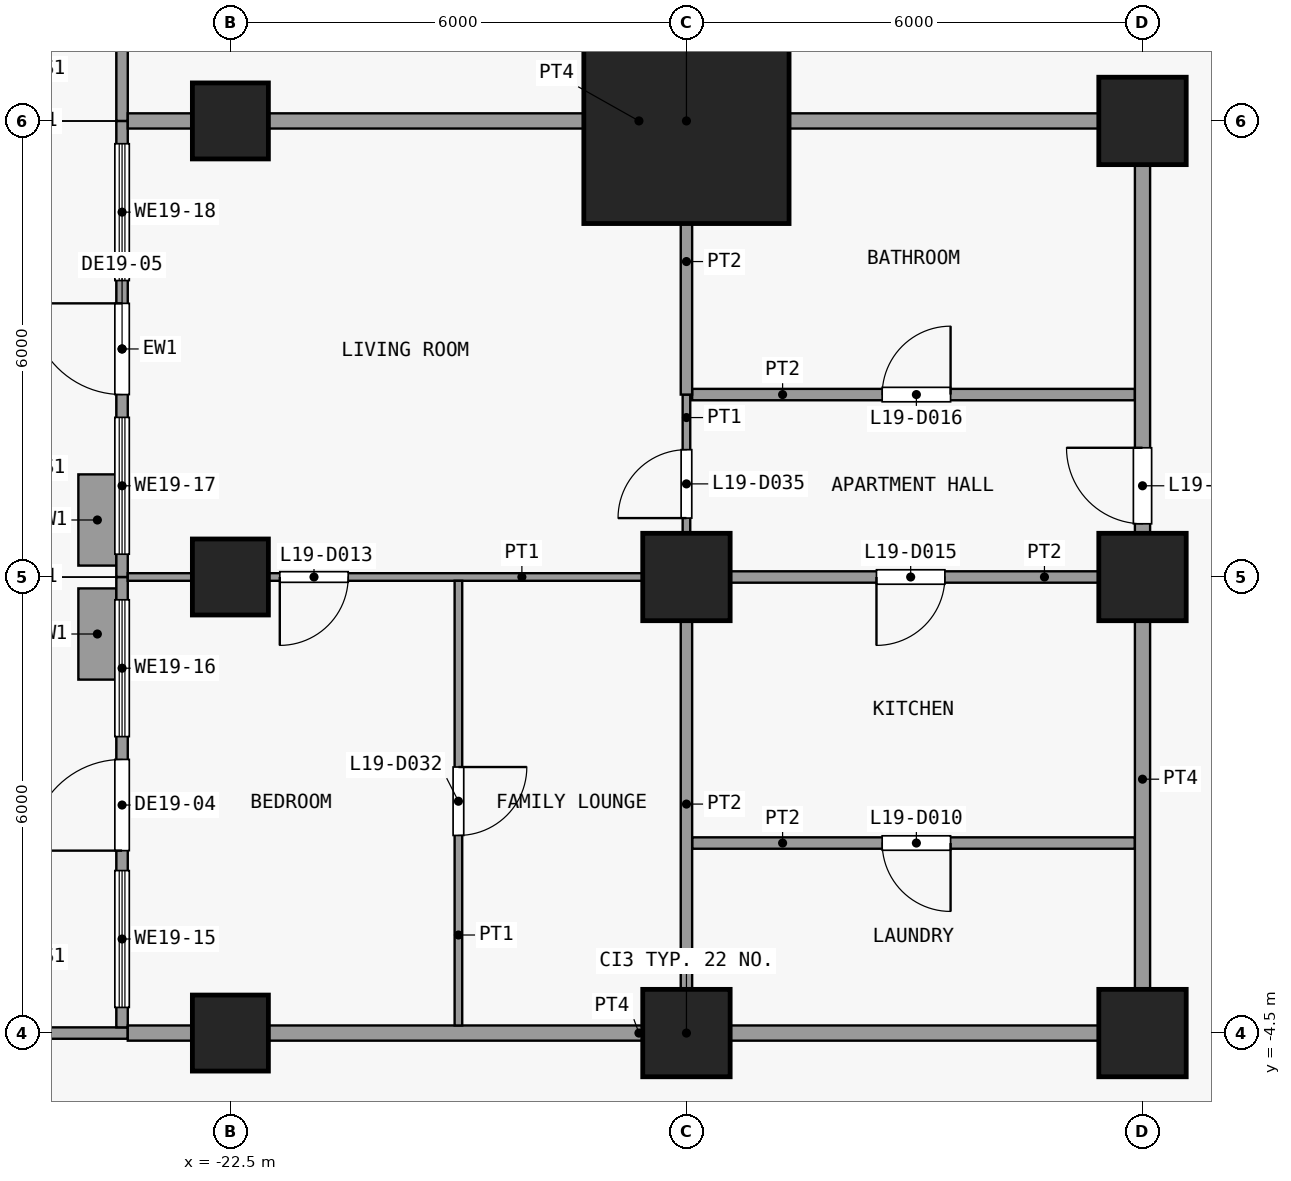
"""IFC4 building model, lengths in metres.
Left out: names, types, materials, properties, quantities, classifications, styles, units other than length and angle.
Written with IfcOpenShell. Run it as: python <this file> out.ifc"""

import sys

from ifc_helpers import new_model, si_unit, direction, frame, frame_2d, origin, origin_2d, place, context, subcontext, project, spatial, rectangle, extrude, element, fill, save


model = new_model("IFC4")
c1 = context("Model", 3, precision=1e-05, world=origin(), true_north=direction((0.0, 1.0)))
c2 = subcontext(c1, "Body", "Model", "MODEL_VIEW")
j1 = project(units=[si_unit("LENGTHUNIT", "METRE"), si_unit("PLANEANGLEUNIT", "RADIAN")], contexts=[c1])
p1 = place(None, origin())
s1 = spatial("IfcSite", under=j1, at=p1, CompositionType="ELEMENT")
p2 = place(p1, origin())
s2 = spatial("IfcBuilding", under=s1, at=p2, CompositionType="ELEMENT")
p3 = place(p2, frame((0.0, 0.0, 81.1)))
s3 = spatial("IfcBuildingStorey", under=s2, at=p3, CompositionType="ELEMENT", Elevation=81.1)
for number, where, z_axis, x_axis in (
    (1, (-22.5, -4.5, 0.0), (0.0, 0.0, 1.0), (1.0, 0.0, 0.0)),
    (2, (-22.5, 1.5, 0.0), (0.0, 0.0, 1.0), (1.0, 0.0, 0.0)),
    (3, (-22.5, 7.5, 0.0), (0.0, 0.0, 1.0), (1.0, 0.0, 0.0)),
):
    element("IfcColumn", number, at=place(p3, frame(where, z_axis=z_axis, x_axis=x_axis)), inside=s3, PredefinedType="COLUMN", context=c2, shape_type="SweptSolid", body=[
        extrude(rectangle(XDim=1.0, YDim=1.0, at=origin_2d()), origin(), (0.0, 0.0, 1.0), 3.6),
    ])
for number, where, z_axis, x_axis in (
    (4, (-16.5, -4.5, 0.0), (0.0, 0.0, 1.0), (1.0, 0.0, 0.0)),
    (5, (-16.5, 1.5, 0.0), (0.0, 0.0, 1.0), (1.0, 0.0, 0.0)),
):
    element("IfcColumn", number, at=place(p3, frame(where, z_axis=z_axis, x_axis=x_axis)), inside=s3, PredefinedType="COLUMN", context=c2, shape_type="SweptSolid", body=[
        extrude(rectangle(XDim=1.15, YDim=1.15, at=origin_2d()), origin(), (0.0, 0.0, 1.0), 3.6),
    ])
p4 = place(p3, frame((-16.5, 7.5, 0.0), z_axis=(0.0, 0.0, 1.0), x_axis=(1.0, 0.0, 0.0)))
e6 = element("IfcColumn", 6, at=p4, inside=s3, PredefinedType="COLUMN", context=c2, shape_type="SweptSolid", body=[
    extrude(rectangle(XDim=2.7, YDim=2.7, at=origin_2d()), origin(), (0.0, 0.0, 1.0), 3.6),
])
for number, where, z_axis, x_axis in (
    (7, (-10.5, -4.5, 0.0), (0.0, 0.0, 1.0), (1.0, 0.0, 0.0)),
    (8, (-10.5, 1.5, 0.0), (0.0, 0.0, 1.0), (1.0, 0.0, 0.0)),
    (9, (-10.5, 7.5, 0.0), (0.0, 0.0, 1.0), (1.0, 0.0, 0.0)),
):
    element("IfcColumn", number, at=place(p3, frame(where, z_axis=z_axis, x_axis=x_axis)), inside=s3, PredefinedType="COLUMN", context=c2, shape_type="SweptSolid", body=[
        extrude(rectangle(XDim=1.15, YDim=1.15, at=origin_2d()), origin(), (0.0, 0.0, 1.0), 3.6),
    ])
p5 = place(p3, frame((-23.85, -4.5, 0.0), z_axis=(0.0, 0.0, 1.0), x_axis=(-1.0, 0.0, 0.0)))
e10 = element("IfcWall", 10, at=p5, inside=s3, PredefinedType="SOLIDWALL", context=c2, shape_type="SweptSolid", body=[
    extrude(rectangle(XDim=2.55, YDim=0.15, at=frame_2d((1.275, 0.0))), origin(), (0.0, 0.0, 1.0), 3.3),
])
p6 = place(p3, frame((-23.925, -4.425, 0.0), z_axis=(0.0, 0.0, 1.0), x_axis=(0.0, 1.0, 0.0)))
e11 = element("IfcWall", 11, at=p6, inside=s3, PredefinedType="SOLIDWALL", context=c2, shape_type="SweptSolid", body=[
    extrude(rectangle(XDim=5.925, YDim=0.15, at=frame_2d((2.962, 0.0))), origin(), (0.0, 0.0, 1.0), 3.3),
])
p7 = place(p6, frame((2.325, 0.0, 0.0)))
e12 = element("IfcOpeningElement", 12, at=p7, cuts=e11, PredefinedType="OPENING", context=c2, shape_type="SweptSolid", body=[
    extrude(rectangle(XDim=1.2, YDim=2.4, at=frame_2d((0.6, 1.2))), frame((0.0, 0.085, 0.0), z_axis=(0.0, -1.0, 0.0), x_axis=(1.0, 0.0, 0.0)), (0.0, 0.0, 1.0), 0.17),
])
p8 = place(p6, frame((0.262, 0.0, 0.9)))
e13 = element("IfcOpeningElement", 13, at=p8, cuts=e11, PredefinedType="OPENING", context=c2, shape_type="SweptSolid", body=[
    extrude(rectangle(XDim=1.8, YDim=2.1, at=frame_2d((0.9, 1.05))), frame((0.0, 0.085, 0.0), z_axis=(0.0, -1.0, 0.0), x_axis=(1.0, 0.0, 0.0)), (0.0, 0.0, 1.0), 0.17),
])
p9 = place(p6, frame((3.825, 0.0, 0.9)))
e14 = element("IfcOpeningElement", 14, at=p9, cuts=e11, PredefinedType="OPENING", context=c2, shape_type="SweptSolid", body=[
    extrude(rectangle(XDim=1.8, YDim=2.1, at=frame_2d((0.9, 1.05))), frame((0.0, 0.085, 0.0), z_axis=(0.0, -1.0, 0.0), x_axis=(1.0, 0.0, 0.0)), (0.0, 0.0, 1.0), 0.17),
])
p10 = place(p3, frame((-24.25, 0.15, 0.0), z_axis=(0.0, 0.0, 1.0), x_axis=(0.0, 1.0, 0.0)))
e15 = element("IfcWall", 15, at=p10, inside=s3, PredefinedType="USERDEFINED", context=c2, shape_type="SweptSolid", body=[
    extrude(rectangle(XDim=1.2, YDim=0.5, at=frame_2d((0.6, 0.0))), origin(), (0.0, 0.0, 1.0), 0.9),
])
p11 = place(p3, frame((-23.925, 1.5, 0.0), z_axis=(0.0, 0.0, 1.0), x_axis=(0.0, 1.0, 0.0)))
e16 = element("IfcWall", 16, at=p11, inside=s3, PredefinedType="SOLIDWALL", context=c2, shape_type="SweptSolid", body=[
    extrude(rectangle(XDim=6.0, YDim=0.15, at=frame_2d((3.0, 0.0))), origin(), (0.0, 0.0, 1.0), 3.3),
])
p12 = place(p11, frame((2.4, 0.0, 0.0)))
e17 = element("IfcOpeningElement", 17, at=p12, cuts=e16, PredefinedType="OPENING", context=c2, shape_type="SweptSolid", body=[
    extrude(rectangle(XDim=1.2, YDim=2.4, at=frame_2d((0.6, 1.2))), frame((0.0, 0.085, 0.0), z_axis=(0.0, -1.0, 0.0), x_axis=(1.0, 0.0, 0.0)), (0.0, 0.0, 1.0), 0.17),
])
p13 = place(p11, frame((0.3, 0.0, 0.9)))
e18 = element("IfcOpeningElement", 18, at=p13, cuts=e16, PredefinedType="OPENING", context=c2, shape_type="SweptSolid", body=[
    extrude(rectangle(XDim=1.8, YDim=2.1, at=frame_2d((0.9, 1.05))), frame((0.0, 0.085, 0.0), z_axis=(0.0, -1.0, 0.0), x_axis=(1.0, 0.0, 0.0)), (0.0, 0.0, 1.0), 0.17),
])
p14 = place(p11, frame((3.9, 0.0, 0.9)))
e19 = element("IfcOpeningElement", 19, at=p14, cuts=e16, PredefinedType="OPENING", context=c2, shape_type="SweptSolid", body=[
    extrude(rectangle(XDim=1.8, YDim=2.1, at=frame_2d((0.9, 1.05))), frame((0.0, 0.085, 0.0), z_axis=(0.0, -1.0, 0.0), x_axis=(1.0, 0.0, 0.0)), (0.0, 0.0, 1.0), 0.17),
])
p15 = place(p3, frame((-24.25, 1.65, 0.0), z_axis=(0.0, 0.0, 1.0), x_axis=(0.0, 1.0, 0.0)))
e20 = element("IfcWall", 20, at=p15, inside=s3, PredefinedType="USERDEFINED", context=c2, shape_type="SweptSolid", body=[
    extrude(rectangle(XDim=1.2, YDim=0.5, at=frame_2d((0.6, 0.0))), origin(), (0.0, 0.0, 1.0), 0.9),
])
p16 = place(p3, frame((-23.925, 7.5, 0.0), z_axis=(0.0, 0.0, 1.0), x_axis=(0.0, 1.0, 0.0)))
e21 = element("IfcWall", 21, at=p16, inside=s3, PredefinedType="SOLIDWALL", context=c2, shape_type="SweptSolid", body=[
    extrude(rectangle(XDim=5.925, YDim=0.15, at=frame_2d((2.962, 0.0))), origin(), (0.0, 0.0, 1.0), 3.3),
])
p17 = place(p16, frame((3.9, 0.0, 0.0)))
e22 = element("IfcOpeningElement", 22, at=p17, cuts=e21, PredefinedType="OPENING", context=c2, shape_type="SweptSolid", body=[
    extrude(rectangle(XDim=1.2, YDim=2.4, at=frame_2d((0.6, 1.2))), frame((0.0, 0.085, 0.0), z_axis=(0.0, -1.0, 0.0), x_axis=(1.0, 0.0, 0.0)), (0.0, 0.0, 1.0), 0.17),
])
p18 = place(p16, frame((1.05, 0.0, 0.9)))
e23 = element("IfcOpeningElement", 23, at=p18, cuts=e21, PredefinedType="OPENING", context=c2, shape_type="SweptSolid", body=[
    extrude(rectangle(XDim=1.8, YDim=2.1, at=frame_2d((0.9, 1.05))), frame((0.0, 0.085, 0.0), z_axis=(0.0, -1.0, 0.0), x_axis=(1.0, 0.0, 0.0)), (0.0, 0.0, 1.0), 0.17),
])
p19 = place(p3, frame((-23.85, -4.5, 0.0), z_axis=(0.0, 0.0, 1.0), x_axis=(1.0, 0.0, 0.0)))
e24 = element("IfcWall", 24, at=p19, inside=s3, PredefinedType="PARTITIONING", context=c2, shape_type="SweptSolid", body=[
    extrude(rectangle(XDim=13.45, YDim=0.2, at=frame_2d((6.725, 0.0))), origin(), (0.0, 0.0, 1.0), 3.3),
])
p20 = place(p3, frame((-16.425, -2.0, 0.0), z_axis=(0.0, 0.0, 1.0), x_axis=(1.0, 0.0, 0.0)))
e25 = element("IfcWall", 25, at=p20, inside=s3, PredefinedType="PARTITIONING", context=c2, shape_type="SweptSolid", body=[
    extrude(rectangle(XDim=5.825, YDim=0.15, at=frame_2d((2.913, 0.0))), origin(), (0.0, 0.0, 1.0), 3.3),
])
p21 = place(p20, frame((2.5, 0.0, 0.0)))
e26 = element("IfcOpeningElement", 26, at=p21, cuts=e25, PredefinedType="OPENING", context=c2, shape_type="SweptSolid", body=[
    extrude(rectangle(XDim=0.9, YDim=2.1, at=frame_2d((0.45, 1.05))), frame((0.0, 0.085, 0.0), z_axis=(0.0, -1.0, 0.0), x_axis=(1.0, 0.0, 0.0)), (0.0, 0.0, 1.0), 0.17),
])
p22 = place(p3, frame((-23.85, 1.5, 0.0), z_axis=(0.0, 0.0, 1.0), x_axis=(1.0, 0.0, 0.0)))
e27 = element("IfcWall", 27, at=p22, inside=s3, PredefinedType="PARTITIONING", context=c2, shape_type="SweptSolid", body=[
    extrude(rectangle(XDim=7.35, YDim=0.1, at=frame_2d((3.675, 0.0))), origin(), (0.0, 0.0, 1.0), 3.3),
])
p23 = place(p22, frame((2.0, 0.0, 0.0)))
e28 = element("IfcOpeningElement", 28, at=p23, cuts=e27, PredefinedType="OPENING", context=c2, shape_type="SweptSolid", body=[
    extrude(rectangle(XDim=0.9, YDim=2.1, at=frame_2d((0.45, 1.05))), frame((0.0, 0.06, 0.0), z_axis=(0.0, -1.0, 0.0), x_axis=(1.0, 0.0, 0.0)), (0.0, 0.0, 1.0), 0.12),
])
p24 = place(p3, frame((-16.5, 1.5, 0.0), z_axis=(0.0, 0.0, 1.0), x_axis=(1.0, 0.0, 0.0)))
e29 = element("IfcWall", 29, at=p24, inside=s3, PredefinedType="PARTITIONING", context=c2, shape_type="SweptSolid", body=[
    extrude(rectangle(XDim=5.9, YDim=0.15, at=frame_2d((2.95, 0.0))), origin(), (0.0, 0.0, 1.0), 3.3),
])
p25 = place(p24, frame((2.5, 0.0, 0.0)))
e30 = element("IfcOpeningElement", 30, at=p25, cuts=e29, PredefinedType="OPENING", context=c2, shape_type="SweptSolid", body=[
    extrude(rectangle(XDim=0.9, YDim=2.1, at=frame_2d((0.45, 1.05))), frame((0.0, 0.085, 0.0), z_axis=(0.0, -1.0, 0.0), x_axis=(1.0, 0.0, 0.0)), (0.0, 0.0, 1.0), 0.17),
])
p26 = place(p3, frame((-16.425, 3.9, 0.0), z_axis=(0.0, 0.0, 1.0), x_axis=(1.0, 0.0, 0.0)))
e31 = element("IfcWall", 31, at=p26, inside=s3, PredefinedType="PARTITIONING", context=c2, shape_type="SweptSolid", body=[
    extrude(rectangle(XDim=5.825, YDim=0.15, at=frame_2d((2.913, 0.0))), origin(), (0.0, 0.0, 1.0), 3.3),
])
p27 = place(p26, frame((2.5, 0.0, 0.0)))
e32 = element("IfcOpeningElement", 32, at=p27, cuts=e31, PredefinedType="OPENING", context=c2, shape_type="SweptSolid", body=[
    extrude(rectangle(XDim=0.9, YDim=2.1, at=frame_2d((0.45, 1.05))), frame((0.0, 0.085, 0.0), z_axis=(0.0, -1.0, 0.0), x_axis=(1.0, 0.0, 0.0)), (0.0, 0.0, 1.0), 0.17),
])
p28 = place(p3, frame((-23.85, 7.5, 0.0), z_axis=(0.0, 0.0, 1.0), x_axis=(1.0, 0.0, 0.0)))
e33 = element("IfcWall", 33, at=p28, inside=s3, PredefinedType="PARTITIONING", context=c2, shape_type="SweptSolid", body=[
    extrude(rectangle(XDim=13.45, YDim=0.2, at=frame_2d((6.725, 0.0))), origin(), (0.0, 0.0, 1.0), 3.3),
])
p29 = place(p3, frame((-19.5, -4.4, 0.0), z_axis=(0.0, 0.0, 1.0), x_axis=(0.0, 1.0, 0.0)))
e34 = element("IfcWall", 34, at=p29, inside=s3, PredefinedType="PARTITIONING", context=c2, shape_type="SweptSolid", body=[
    extrude(rectangle(XDim=5.85, YDim=0.1, at=frame_2d((2.925, 0.0))), origin(), (0.0, 0.0, 1.0), 3.3),
])
p30 = place(p29, frame((2.5, 0.0, 0.0)))
e35 = element("IfcOpeningElement", 35, at=p30, cuts=e34, PredefinedType="OPENING", context=c2, shape_type="SweptSolid", body=[
    extrude(rectangle(XDim=0.9, YDim=2.1, at=frame_2d((0.45, 1.05))), frame((0.0, 0.06, 0.0), z_axis=(0.0, -1.0, 0.0), x_axis=(1.0, 0.0, 0.0)), (0.0, 0.0, 1.0), 0.12),
])
p31 = place(p3, frame((-16.5, 1.575, 0.0), z_axis=(0.0, 0.0, 1.0), x_axis=(0.0, 1.0, 0.0)))
e36 = element("IfcWall", 36, at=p31, inside=s3, PredefinedType="PARTITIONING", context=c2, shape_type="SweptSolid", body=[
    extrude(rectangle(XDim=2.325, YDim=0.1, at=frame_2d((1.163, 0.0))), origin(), (0.0, 0.0, 1.0), 3.3),
])
p32 = place(p31, frame((0.7, 0.0, 0.0)))
e37 = element("IfcOpeningElement", 37, at=p32, cuts=e36, PredefinedType="OPENING", context=c2, shape_type="SweptSolid", body=[
    extrude(rectangle(XDim=0.9, YDim=2.1, at=frame_2d((0.45, 1.05))), frame((0.0, 0.06, 0.0), z_axis=(0.0, -1.0, 0.0), x_axis=(1.0, 0.0, 0.0)), (0.0, 0.0, 1.0), 0.12),
])
p33 = place(p3, frame((-16.5, -4.4, 0.0), z_axis=(0.0, 0.0, 1.0), x_axis=(0.0, 1.0, 0.0)))
e38 = element("IfcWall", 38, at=p33, inside=s3, PredefinedType="PARTITIONING", context=c2, shape_type="SweptSolid", body=[
    extrude(rectangle(XDim=5.825, YDim=0.15, at=frame_2d((2.913, 0.0))), origin(), (0.0, 0.0, 1.0), 3.3),
])
p34 = place(p3, frame((-16.5, 3.9, 0.0), z_axis=(0.0, 0.0, 1.0), x_axis=(0.0, 1.0, 0.0)))
e39 = element("IfcWall", 39, at=p34, inside=s3, PredefinedType="PARTITIONING", context=c2, shape_type="SweptSolid", body=[
    extrude(rectangle(XDim=3.5, YDim=0.15, at=frame_2d((1.75, 0.0))), origin(), (0.0, 0.0, 1.0), 3.3),
])
p35 = place(p3, frame((-10.5, -4.4, 0.0), z_axis=(0.0, 0.0, 1.0), x_axis=(0.0, 1.0, 0.0)))
e40 = element("IfcWall", 40, at=p35, inside=s3, PredefinedType="PARTITIONING", context=c2, shape_type="SweptSolid", body=[
    extrude(rectangle(XDim=11.8, YDim=0.2, at=frame_2d((5.9, 0.0))), origin(), (0.0, 0.0, 1.0), 3.3),
])
p36 = place(p35, frame((6.6, 0.0, 0.0)))
e41 = element("IfcOpeningElement", 41, at=p36, cuts=e40, PredefinedType="OPENING", context=c2, shape_type="SweptSolid", body=[
    extrude(rectangle(XDim=1.0, YDim=2.1, at=frame_2d((0.5, 1.05))), frame((0.0, 0.11, 0.0), z_axis=(0.0, -1.0, 0.0), x_axis=(1.0, 0.0, 0.0)), (0.0, 0.0, 1.0), 0.22),
])
p37 = place(p7, origin())
e42 = element("IfcDoor", 42, at=p37, inside=s3, OperationType="SINGLE_SWING_LEFT", PredefinedType="DOOR", context=c2, shape_type="SweptSolid", body=[
    extrude(rectangle(XDim=1.2, YDim=2.4, at=frame_2d((0.6, 1.2))), frame((0.0, 0.025, 0.0), z_axis=(0.0, -1.0, 0.0), x_axis=(1.0, 0.0, 0.0)), (0.0, 0.0, 1.0), 0.05),
])
fill(e12, e42)
p38 = place(p8, origin())
e43 = element("IfcWindow", 43, at=p38, inside=s3, PartitioningType="SINGLE_PANEL", PredefinedType="WINDOW", context=c2, shape_type="SweptSolid", body=[
    extrude(rectangle(XDim=1.8, YDim=2.1, at=frame_2d((0.9, 1.05))), frame((0.0, 0.03, 0.0), z_axis=(0.0, -1.0, 0.0), x_axis=(1.0, 0.0, 0.0)), (0.0, 0.0, 1.0), 0.06),
])
fill(e13, e43)
p39 = place(p9, origin())
e44 = element("IfcWindow", 44, at=p39, inside=s3, PartitioningType="SINGLE_PANEL", PredefinedType="WINDOW", context=c2, shape_type="SweptSolid", body=[
    extrude(rectangle(XDim=1.8, YDim=2.1, at=frame_2d((0.9, 1.05))), frame((0.0, 0.03, 0.0), z_axis=(0.0, -1.0, 0.0), x_axis=(1.0, 0.0, 0.0)), (0.0, 0.0, 1.0), 0.06),
])
fill(e14, e44)
p40 = place(p12, origin())
e45 = element("IfcDoor", 45, at=p40, inside=s3, OperationType="SINGLE_SWING_RIGHT", PredefinedType="DOOR", context=c2, shape_type="SweptSolid", body=[
    extrude(rectangle(XDim=1.2, YDim=2.4, at=frame_2d((0.6, 1.2))), frame((0.0, 0.025, 0.0), z_axis=(0.0, -1.0, 0.0), x_axis=(1.0, 0.0, 0.0)), (0.0, 0.0, 1.0), 0.05),
])
fill(e17, e45)
p41 = place(p13, origin())
e46 = element("IfcWindow", 46, at=p41, inside=s3, PartitioningType="SINGLE_PANEL", PredefinedType="WINDOW", context=c2, shape_type="SweptSolid", body=[
    extrude(rectangle(XDim=1.8, YDim=2.1, at=frame_2d((0.9, 1.05))), frame((0.0, 0.03, 0.0), z_axis=(0.0, -1.0, 0.0), x_axis=(1.0, 0.0, 0.0)), (0.0, 0.0, 1.0), 0.06),
])
fill(e18, e46)
p42 = place(p14, origin())
e47 = element("IfcWindow", 47, at=p42, inside=s3, PartitioningType="SINGLE_PANEL", PredefinedType="WINDOW", context=c2, shape_type="SweptSolid", body=[
    extrude(rectangle(XDim=1.8, YDim=2.1, at=frame_2d((0.9, 1.05))), frame((0.0, 0.03, 0.0), z_axis=(0.0, -1.0, 0.0), x_axis=(1.0, 0.0, 0.0)), (0.0, 0.0, 1.0), 0.06),
])
fill(e19, e47)
p43 = place(p21, origin())
e48 = element("IfcDoor", 48, at=p43, inside=s3, OperationType="SINGLE_SWING_RIGHT", PredefinedType="DOOR", context=c2, shape_type="SweptSolid", body=[
    extrude(rectangle(XDim=0.9, YDim=2.1, at=frame_2d((0.45, 1.05))), frame((0.0, 0.025, 0.0), z_axis=(0.0, -1.0, 0.0), x_axis=(1.0, 0.0, 0.0)), (0.0, 0.0, 1.0), 0.05),
])
fill(e26, e48)
p44 = place(p23, origin())
e49 = element("IfcDoor", 49, at=p44, inside=s3, OperationType="SINGLE_SWING_LEFT", PredefinedType="DOOR", context=c2, shape_type="SweptSolid", body=[
    extrude(rectangle(XDim=0.9, YDim=2.1, at=frame_2d((0.45, 1.05))), frame((0.0, 0.025, 0.0), z_axis=(0.0, -1.0, 0.0), x_axis=(1.0, 0.0, 0.0)), (0.0, 0.0, 1.0), 0.05),
])
fill(e28, e49)
p45 = place(p25, origin())
e50 = element("IfcDoor", 50, at=p45, inside=s3, OperationType="SINGLE_SWING_LEFT", PredefinedType="DOOR", context=c2, shape_type="SweptSolid", body=[
    extrude(rectangle(XDim=0.9, YDim=2.1, at=frame_2d((0.45, 1.05))), frame((0.0, 0.025, 0.0), z_axis=(0.0, -1.0, 0.0), x_axis=(1.0, 0.0, 0.0)), (0.0, 0.0, 1.0), 0.05),
])
fill(e30, e50)
p46 = place(p27, origin())
e51 = element("IfcDoor", 51, at=p46, inside=s3, OperationType="SINGLE_SWING_LEFT", PredefinedType="DOOR", context=c2, shape_type="SweptSolid", body=[
    extrude(rectangle(XDim=0.9, YDim=2.1, at=frame_2d((0.45, 1.05))), frame((0.0, 0.025, 0.0), z_axis=(0.0, -1.0, 0.0), x_axis=(1.0, 0.0, 0.0)), (0.0, 0.0, 1.0), 0.05),
])
fill(e32, e51)
p47 = place(p30, origin())
e52 = element("IfcDoor", 52, at=p47, inside=s3, OperationType="SINGLE_SWING_RIGHT", PredefinedType="DOOR", context=c2, shape_type="SweptSolid", body=[
    extrude(rectangle(XDim=0.9, YDim=2.1, at=frame_2d((0.45, 1.05))), frame((0.0, 0.025, 0.0), z_axis=(0.0, -1.0, 0.0), x_axis=(1.0, 0.0, 0.0)), (0.0, 0.0, 1.0), 0.05),
])
fill(e35, e52)
p48 = place(p32, origin())
e53 = element("IfcDoor", 53, at=p48, inside=s3, OperationType="SINGLE_SWING_RIGHT", PredefinedType="DOOR", context=c2, shape_type="SweptSolid", body=[
    extrude(rectangle(XDim=0.9, YDim=2.1, at=frame_2d((0.45, 1.05))), frame((0.0, 0.025, 0.0), z_axis=(0.0, -1.0, 0.0), x_axis=(1.0, 0.0, 0.0)), (0.0, 0.0, 1.0), 0.05),
])
fill(e37, e53)
p49 = place(p36, origin())
e54 = element("IfcDoor", 54, at=p49, inside=s3, OperationType="SINGLE_SWING_LEFT", PredefinedType="DOOR", context=c2, shape_type="SweptSolid", body=[
    extrude(rectangle(XDim=1.0, YDim=2.1, at=frame_2d((0.5, 1.05))), frame((0.0, 0.025, 0.0), z_axis=(0.0, -1.0, 0.0), x_axis=(1.0, 0.0, 0.0)), (0.0, 0.0, 1.0), 0.05),
])
fill(e41, e54)
save(model, sys.argv[1])
